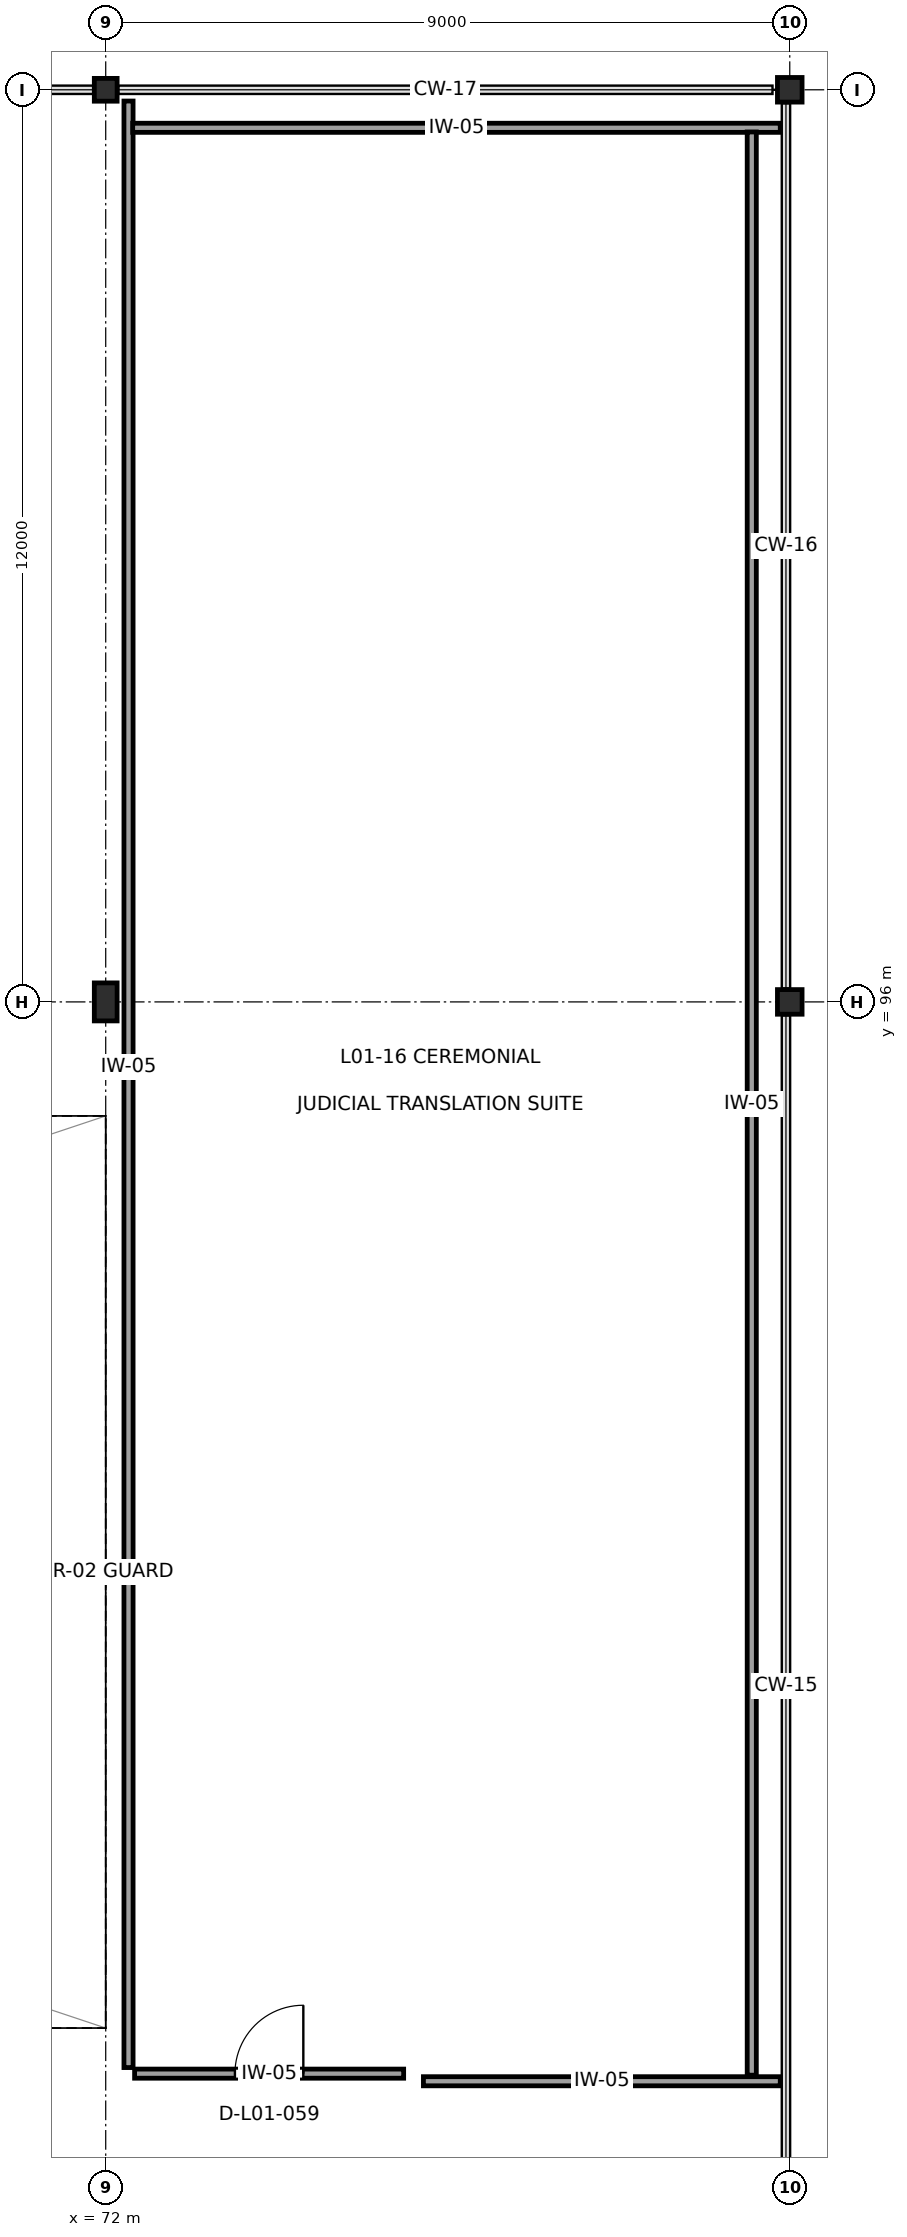
"""IFC4 building model, lengths in metres.
Left out: names, types, materials, properties, quantities, classifications, styles, units other than length and angle.
Written with IfcOpenShell. Run it as: python <this file> out.ifc"""

import sys

from ifc_helpers import new_model, si_unit, direction, frame, frame_2d, origin, origin_2d, place, context, subcontext, project, spatial, rectangle, hollow_circle, i_section, extrude, element, fill, save


model = new_model("IFC4")
c1 = context("Model", 3, precision=1e-05, world=origin(), true_north=direction((0.0, 1.0)))
c2 = subcontext(c1, "Body", "Model", "MODEL_VIEW")
j1 = project(units=[si_unit("LENGTHUNIT", "METRE"), si_unit("PLANEANGLEUNIT", "RADIAN")], contexts=[c1])
p1 = place(None, origin())
s1 = spatial("IfcSite", under=j1, at=p1, CompositionType="ELEMENT")
p2 = place(p1, origin())
s2 = spatial("IfcBuilding", under=s1, at=p2, CompositionType="ELEMENT")
p3 = place(p2, frame((0.0, 0.0, 5.4)))
s3 = spatial("IfcBuildingStorey", under=s2, at=p3, CompositionType="ELEMENT", Elevation=5.4)
p4 = place(p3, frame((72.0, 96.0, 0.0), z_axis=(0.0, 0.0, 1.0), x_axis=(1.0, 0.0, 0.0)))
e1 = element("IfcColumn", 1, at=p4, inside=s3, PredefinedType="COLUMN", context=c2, shape_type="SweptSolid", body=[
    extrude(i_section(OverallWidth=0.3, OverallDepth=0.5, WebThickness=0.014, FlangeThickness=0.028, at=origin_2d()), origin(), (0.0, 0.0, 1.0), 4.5),
])
p5 = place(p3, frame((72.0, 108.0, 0.0), z_axis=(0.0, 0.0, 1.0), x_axis=(1.0, 0.0, 0.0)))
e2 = element("IfcColumn", 2, at=p5, inside=s3, PredefinedType="COLUMN", context=c2, shape_type="SweptSolid", body=[
    extrude(i_section(OverallWidth=0.3, OverallDepth=0.3, WebThickness=0.011, FlangeThickness=0.019, at=origin_2d()), origin(), (0.0, 0.0, 1.0), 4.5),
])
for number, where, z_axis, x_axis in (
    (3, (81.0, 96.0, 0.0), (0.0, 0.0, 1.0), (1.0, 0.0, 0.0)),
    (4, (81.0, 108.0, 0.0), (0.0, 0.0, 1.0), (1.0, 0.0, 0.0)),
):
    element("IfcColumn", number, at=place(p3, frame(where, z_axis=z_axis, x_axis=x_axis)), inside=s3, PredefinedType="PILASTER", context=c2, shape_type="SweptSolid", body=[
        extrude(hollow_circle(Radius=0.162, WallThickness=0.012, at=origin_2d()), origin(), (0.0, 0.0, 1.0), 4.5),
    ])
p6 = place(p3, frame((75.92, 81.9, 0.0), z_axis=(0.0, 0.0, 1.0), x_axis=(-1.0, 0.0, 0.0)))
e5 = element("IfcWall", 5, at=p6, inside=s3, PredefinedType="PARTITIONING", context=c2, shape_type="SweptSolid", body=[
    extrude(rectangle(XDim=3.54, YDim=0.12, at=frame_2d((1.77, 0.0))), origin(), (0.0, 0.0, 1.0), 4.14),
])
p7 = place(p6, frame((1.32, 0.0, 0.0)))
e6 = element("IfcOpeningElement", 6, at=p7, cuts=e5, PredefinedType="OPENING", context=c2, shape_type="SweptSolid", body=[
    extrude(rectangle(XDim=0.9, YDim=2.1, at=frame_2d((0.45, 1.05))), frame((0.0, 0.075, 0.0), z_axis=(0.0, -1.0, 0.0), x_axis=(1.0, 0.0, 0.0)), (0.0, 0.0, 1.0), 0.15),
])
p8 = place(p3, frame((72.3, 81.98, 0.0), z_axis=(0.0, 0.0, 1.0), x_axis=(0.0, 1.0, 0.0)))
e7 = element("IfcWall", 7, at=p8, inside=s3, PredefinedType="PARTITIONING", context=c2, shape_type="SweptSolid", body=[
    extrude(rectangle(XDim=25.872, YDim=0.12, at=frame_2d((12.936, 0.0))), origin(), (0.0, 0.0, 1.0), 4.14),
])
p9 = place(p3, frame((72.355, 107.5, 0.0), z_axis=(0.0, 0.0, 1.0), x_axis=(1.0, 0.0, 0.0)))
e8 = element("IfcWall", 8, at=p9, inside=s3, PredefinedType="PARTITIONING", context=c2, shape_type="SweptSolid", body=[
    extrude(rectangle(XDim=8.52, YDim=0.12, at=frame_2d((4.26, 0.0))), origin(), (0.0, 0.0, 1.0), 4.14),
])
p10 = place(p3, frame((80.5, 107.445, 0.0), z_axis=(0.0, 0.0, 1.0), x_axis=(0.0, -1.0, 0.0)))
e9 = element("IfcWall", 9, at=p10, inside=s3, PredefinedType="PARTITIONING", context=c2, shape_type="SweptSolid", body=[
    extrude(rectangle(XDim=25.565, YDim=0.12, at=frame_2d((12.783, 0.0))), origin(), (0.0, 0.0, 1.0), 4.14),
])
p11 = place(p3, frame((80.875, 81.8, 0.0), z_axis=(0.0, 0.0, 1.0), x_axis=(-1.0, 0.0, 0.0)))
e10 = element("IfcWall", 10, at=p11, inside=s3, PredefinedType="PARTITIONING", context=c2, shape_type="SweptSolid", body=[
    extrude(rectangle(XDim=4.695, YDim=0.12, at=frame_2d((2.348, 0.0))), origin(), (0.0, 0.0, 1.0), 4.14),
])
p12 = place(p7, frame((0.9, 0.0, 0.0), z_axis=(0.0, 0.0, 1.0), x_axis=(-1.0, 0.0, 0.0)))
e11 = element("IfcDoor", 11, at=p12, inside=s3, OperationType="SINGLE_SWING_LEFT", PredefinedType="DOOR", context=c2, shape_type="SweptSolid", body=[
    extrude(rectangle(XDim=0.9, YDim=2.1, at=frame_2d((0.45, 1.05))), frame((0.0, 0.025, 0.0), z_axis=(0.0, -1.0, 0.0), x_axis=(1.0, 0.0, 0.0)), (0.0, 0.0, 1.0), 0.05),
])
fill(e6, e11)
save(model, sys.argv[1])
